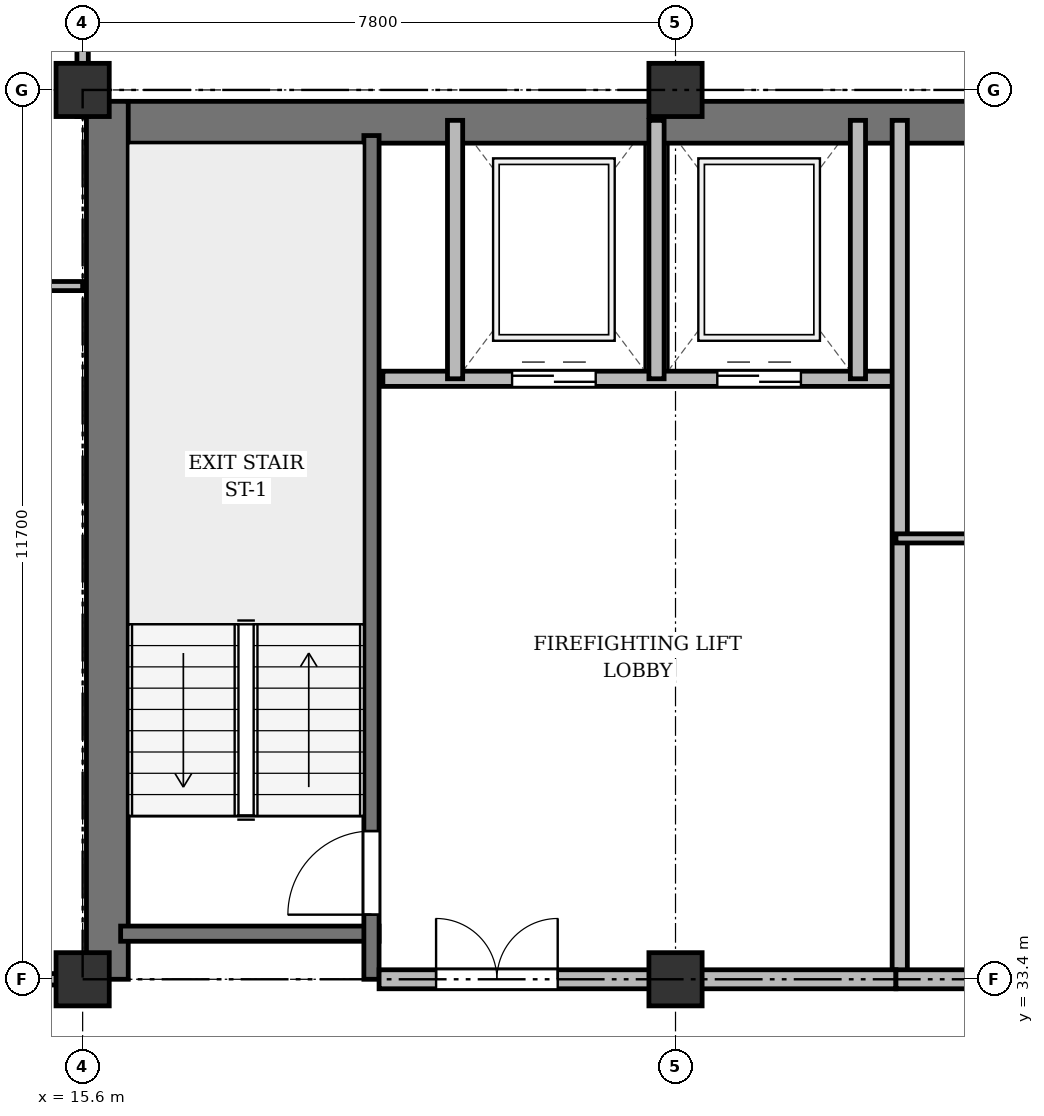
"""IFC4 building model, lengths in metres.
Left out: names, types, materials, properties, quantities, classifications, styles, units other than length and angle.
Written with IfcOpenShell. Run it as: python <this file> out.ifc"""

import sys

from ifc_helpers import new_model, si_unit, direction, frame, frame_2d, origin, origin_2d, place, context, subcontext, project, spatial, rectangle, extrude, source, transform, mapped, element, fill, save


model = new_model("IFC4")
c1 = context("Model", 3, precision=1e-05, world=origin(), true_north=direction((0.0, 1.0)))
c2 = subcontext(c1, "Body", "Model", "MODEL_VIEW")
j1 = project(units=[si_unit("LENGTHUNIT", "METRE"), si_unit("PLANEANGLEUNIT", "RADIAN")], contexts=[c1])
p1 = place(None, origin())
s1 = spatial("IfcSite", under=j1, at=p1, CompositionType="ELEMENT")
p2 = place(p1, origin())
s2 = spatial("IfcBuilding", under=s1, at=p2, CompositionType="ELEMENT")
p3 = place(p2, frame((0.0, 0.0, 190.5)))
s3 = spatial("IfcBuildingStorey", under=s2, at=p3, CompositionType="ELEMENT", Elevation=190.5)
m1 = source(origin(), c2, "Body", "SweptSolid", [
    extrude(rectangle(XDim=0.7, YDim=0.7, at=origin_2d()), origin(), (0.0, 0.0, 1.0), 3.6),
])
for number, where, z_axis, x_axis in (
    (1, (15.6, 33.4, 0.0), (0.0, 0.0, 1.0), (1.0, 0.0, 0.0)),
    (2, (15.6, 45.1, 0.0), (0.0, 0.0, 1.0), (1.0, 0.0, 0.0)),
    (3, (23.4, 33.4, 0.0), (0.0, 0.0, 1.0), (1.0, 0.0, 0.0)),
    (4, (23.4, 45.1, 0.0), (0.0, 0.0, 1.0), (1.0, 0.0, 0.0)),
):
    element("IfcColumn", number, at=place(p3, frame(where, z_axis=z_axis, x_axis=x_axis)), inside=s3, PredefinedType="COLUMN", context=c2, shape_type="MappedRepresentation", body=[
        mapped(m1, transform((0.0, 0.0, 0.0), x_axis=(1.0, 0.0, 0.0), y_axis=(0.0, 1.0, 0.0), z_axis=(0.0, 0.0, 1.0), scale=1.0)),
    ])
p4 = place(p3, frame((15.65, 44.675, 0.0), z_axis=(0.0, 0.0, 1.0), x_axis=(1.0, 0.0, 0.0)))
e5 = element("IfcWall", 5, at=p4, inside=s3, PredefinedType="SHEAR", context=c2, shape_type="SweptSolid", body=[
    extrude(rectangle(XDim=43.1, YDim=0.55, at=frame_2d((21.55, 0.0))), origin(), (0.0, 0.0, 1.0), 3.36),
])
p5 = place(p3, frame((15.925, 33.4, 0.0), z_axis=(0.0, 0.0, 1.0), x_axis=(0.0, 1.0, 0.0)))
e6 = element("IfcWall", 6, at=p5, inside=s3, PredefinedType="SHEAR", context=c2, shape_type="SweptSolid", body=[
    extrude(rectangle(XDim=11.55, YDim=0.55, at=frame_2d((5.775, 0.0))), origin(), (0.0, 0.0, 1.0), 3.36),
])
p6 = place(p3, frame((16.1, 34.0, 0.0), z_axis=(0.0, 0.0, 1.0), x_axis=(1.0, 0.0, 0.0)))
e7 = element("IfcWall", 7, at=p6, inside=s3, PredefinedType="SHEAR", context=c2, shape_type="SweptSolid", body=[
    extrude(rectangle(XDim=3.4, YDim=0.2, at=frame_2d((1.7, 0.0))), origin(), (0.0, 0.0, 1.0), 3.36),
])
p7 = place(p3, frame((19.4, 33.4, 0.0), z_axis=(0.0, 0.0, 1.0), x_axis=(0.0, 1.0, 0.0)))
e8 = element("IfcWall", 8, at=p7, inside=s3, PredefinedType="SHEAR", context=c2, shape_type="SweptSolid", body=[
    extrude(rectangle(XDim=11.1, YDim=0.2, at=frame_2d((5.55, 0.0))), origin(), (0.0, 0.0, 1.0), 3.36),
])
p8 = place(p7, frame((0.85, 0.0, 0.0)))
e9 = element("IfcOpeningElement", 9, at=p8, cuts=e8, PredefinedType="OPENING", context=c2, shape_type="SweptSolid", body=[
    extrude(rectangle(XDim=1.1, YDim=2.15, at=frame_2d((0.55, 1.075))), frame((0.0, 0.11, 0.0), z_axis=(0.0, -1.0, 0.0), x_axis=(1.0, 0.0, 0.0)), (0.0, 0.0, 1.0), 0.22),
])
p9 = place(p3, frame((19.55, 41.3, 0.0), z_axis=(0.0, 0.0, 1.0), x_axis=(1.0, 0.0, 0.0)))
e10 = element("IfcWall", 10, at=p9, inside=s3, PredefinedType="SOLIDWALL", context=c2, shape_type="SweptSolid", body=[
    extrude(rectangle(XDim=6.75, YDim=0.2, at=frame_2d((3.375, 0.0))), origin(), (0.0, 0.0, 1.0), 3.36),
])
p10 = place(p9, frame((1.7, 0.0, 0.0)))
e11 = element("IfcOpeningElement", 11, at=p10, cuts=e10, PredefinedType="OPENING", context=c2, shape_type="SweptSolid", body=[
    extrude(rectangle(XDim=1.1, YDim=2.15, at=frame_2d((0.55, 1.075))), frame((0.0, 0.11, 0.0), z_axis=(0.0, -1.0, 0.0), x_axis=(1.0, 0.0, 0.0)), (0.0, 0.0, 1.0), 0.22),
])
p11 = place(p9, frame((4.4, 0.0, 0.0)))
e12 = element("IfcOpeningElement", 12, at=p11, cuts=e10, PredefinedType="OPENING", context=c2, shape_type="SweptSolid", body=[
    extrude(rectangle(XDim=1.1, YDim=2.15, at=frame_2d((0.55, 1.075))), frame((0.0, 0.11, 0.0), z_axis=(0.0, -1.0, 0.0), x_axis=(1.0, 0.0, 0.0)), (0.0, 0.0, 1.0), 0.22),
])
for number, where, z_axis, x_axis in (
    (13, (20.5, 41.3, 0.0), (0.0, 0.0, 1.0), (0.0, 1.0, 0.0)),
    (14, (23.15, 41.3, 0.0), (0.0, 0.0, 1.0), (0.0, 1.0, 0.0)),
    (15, (25.8, 41.3, 0.0), (0.0, 0.0, 1.0), (0.0, 1.0, 0.0)),
):
    element("IfcWall", number, at=place(p3, frame(where, z_axis=z_axis, x_axis=x_axis)), inside=s3, PredefinedType="SOLIDWALL", context=c2, shape_type="SweptSolid", body=[
        extrude(rectangle(XDim=3.4, YDim=0.2, at=frame_2d((1.7, 0.0))), origin(), (0.0, 0.0, 1.0), 3.36),
    ])
p12 = place(p3, frame((26.35, 33.4, 0.0), z_axis=(0.0, 0.0, 1.0), x_axis=(0.0, 1.0, 0.0)))
e16 = element("IfcWall", 16, at=p12, inside=s3, PredefinedType="SOLIDWALL", context=c2, shape_type="SweptSolid", body=[
    extrude(rectangle(XDim=11.3, YDim=0.2, at=frame_2d((5.65, 0.0))), origin(), (0.0, 0.0, 1.0), 2.91),
])
p13 = place(p3, frame((19.5, 33.4, 0.0), z_axis=(0.0, 0.0, 1.0), x_axis=(1.0, 0.0, 0.0)))
e17 = element("IfcWall", 17, at=p13, inside=s3, PredefinedType="PARTITIONING", context=c2, shape_type="SweptSolid", body=[
    extrude(rectangle(XDim=6.8, YDim=0.25, at=frame_2d((3.4, 0.0))), origin(), (0.0, 0.0, 1.0), 2.91),
])
p14 = place(p13, frame((0.75, 0.0, 0.0)))
e18 = element("IfcOpeningElement", 18, at=p14, cuts=e17, PredefinedType="OPENING", context=c2, shape_type="SweptSolid", body=[
    extrude(rectangle(XDim=1.6, YDim=2.2, at=frame_2d((0.8, 1.1))), frame((0.0, 0.135, 0.0), z_axis=(0.0, -1.0, 0.0), x_axis=(1.0, 0.0, 0.0)), (0.0, 0.0, 1.0), 0.27),
])
p15 = place(p3, frame((26.3, 39.2, 0.0), z_axis=(0.0, 0.0, 1.0), x_axis=(1.0, 0.0, 0.0)))
e19 = element("IfcWall", 19, at=p15, inside=s3, PredefinedType="PARTITIONING", context=c2, shape_type="SweptSolid", body=[
    extrude(rectangle(XDim=7.0, YDim=0.12, at=frame_2d((3.5, 0.0))), origin(), (0.0, 0.0, 1.0), 2.86),
])
p16 = place(p15, frame((2.6, 0.0, 0.0)))
e20 = element("IfcOpeningElement", 20, at=p16, cuts=e19, PredefinedType="OPENING", context=c2, shape_type="SweptSolid", body=[
    extrude(rectangle(XDim=0.95, YDim=2.15, at=frame_2d((0.475, 1.075))), frame((0.0, 0.07, 0.0), z_axis=(0.0, -1.0, 0.0), x_axis=(1.0, 0.0, 0.0)), (0.0, 0.0, 1.0), 0.14),
])
p17 = place(p3, frame((26.3, 33.4, 0.0), z_axis=(0.0, 0.0, 1.0), x_axis=(1.0, 0.0, 0.0)))
e21 = element("IfcWall", 21, at=p17, inside=s3, PredefinedType="PARTITIONING", context=c2, shape_type="SweptSolid", body=[
    extrude(rectangle(XDim=7.0, YDim=0.25, at=frame_2d((3.5, 0.0))), origin(), (0.0, 0.0, 1.0), 2.91),
])
p18 = place(p17, frame((1.35, 0.0, 0.0)))
e22 = element("IfcOpeningElement", 22, at=p18, cuts=e21, PredefinedType="OPENING", context=c2, shape_type="SweptSolid", body=[
    extrude(rectangle(XDim=0.95, YDim=2.15, at=frame_2d((0.475, 1.075))), frame((0.0, 0.135, 0.0), z_axis=(0.0, -1.0, 0.0), x_axis=(1.0, 0.0, 0.0)), (0.0, 0.0, 1.0), 0.27),
])
p19 = place(p3, frame((11.925, 42.52, 0.0), z_axis=(0.0, 0.0, 1.0), x_axis=(1.0, 0.0, 0.0)))
e23 = element("IfcWall", 23, at=p19, inside=s3, PredefinedType="PARTITIONING", context=c2, shape_type="SweptSolid", body=[
    extrude(rectangle(XDim=3.675, YDim=0.12, at=frame_2d((1.837, 0.0))), origin(), (0.0, 0.0, 1.0), 2.86),
])
p20 = place(p19, frame((1.362, 0.0, 0.0)))
e24 = element("IfcOpeningElement", 24, at=p20, cuts=e23, PredefinedType="OPENING", context=c2, shape_type="SweptSolid", body=[
    extrude(rectangle(XDim=0.95, YDim=2.15, at=frame_2d((0.475, 1.075))), frame((0.0, 0.07, 0.0), z_axis=(0.0, -1.0, 0.0), x_axis=(1.0, 0.0, 0.0)), (0.0, 0.0, 1.0), 0.14),
])
p21 = place(p3, frame((8.25, 33.4, 0.0), z_axis=(0.0, 0.0, 1.0), x_axis=(1.0, 0.0, 0.0)))
e25 = element("IfcWall", 25, at=p21, inside=s3, PredefinedType="PARTITIONING", context=c2, shape_type="SweptSolid", body=[
    extrude(rectangle(XDim=7.35, YDim=0.15, at=frame_2d((3.675, 0.0))), origin(), (0.0, 0.0, 1.0), 2.91),
])
p22 = place(p21, frame((4.275, 0.0, 0.0)))
e26 = element("IfcOpeningElement", 26, at=p22, cuts=e25, PredefinedType="OPENING", context=c2, shape_type="SweptSolid", body=[
    extrude(rectangle(XDim=0.95, YDim=2.15, at=frame_2d((0.475, 1.075))), frame((0.0, 0.085, 0.0), z_axis=(0.0, -1.0, 0.0), x_axis=(1.0, 0.0, 0.0)), (0.0, 0.0, 1.0), 0.17),
])
p23 = place(p3, frame((15.6, 44.75, 0.0), z_axis=(0.0, 0.0, 1.0), x_axis=(0.0, 1.0, 0.0)))
e27 = element("IfcWall", 27, at=p23, inside=s3, PredefinedType="PARTITIONING", context=c2, shape_type="SweptSolid", body=[
    extrude(rectangle(XDim=3.61, YDim=0.15, at=frame_2d((1.805, 0.0))), origin(), (0.0, 0.0, 1.0), 2.86),
])
p24 = place(p23, frame((1.1, 0.0, 0.0)))
e28 = element("IfcOpeningElement", 28, at=p24, cuts=e27, PredefinedType="OPENING", context=c2, shape_type="SweptSolid", body=[
    extrude(rectangle(XDim=0.95, YDim=2.15, at=frame_2d((0.475, 1.075))), frame((0.0, 0.085, 0.0), z_axis=(0.0, -1.0, 0.0), x_axis=(1.0, 0.0, 0.0)), (0.0, 0.0, 1.0), 0.17),
])
m2 = source(origin(), c2, "Body", "SweptSolid", [
    extrude(rectangle(XDim=1.1, YDim=2.15, at=frame_2d((0.55, 1.075))), frame((0.0, 0.025, 0.0), z_axis=(0.0, -1.0, 0.0), x_axis=(1.0, 0.0, 0.0)), (0.0, 0.0, 1.0), 0.05),
])
p25 = place(p8, origin())
e29 = element("IfcDoor", 29, at=p25, inside=s3, OperationType="SINGLE_SWING_LEFT", PredefinedType="DOOR", context=c2, shape_type="MappedRepresentation", body=[
    mapped(m2, transform((0.0, 0.0, 0.0), x_axis=(1.0, 0.0, 0.0), y_axis=(0.0, 1.0, 0.0), z_axis=(0.0, 0.0, 1.0), scale=1.0)),
])
fill(e9, e29)
p26 = place(p10, origin())
e30 = element("IfcDoor", 30, at=p26, inside=s3, OperationType="DOUBLE_DOOR_SLIDING", PredefinedType="DOOR", context=c2, shape_type="MappedRepresentation", body=[
    mapped(m2, transform((0.0, 0.0, 0.0), x_axis=(1.0, 0.0, 0.0), y_axis=(0.0, 1.0, 0.0), z_axis=(0.0, 0.0, 1.0), scale=1.0)),
])
fill(e11, e30)
p27 = place(p11, origin())
e31 = element("IfcDoor", 31, at=p27, inside=s3, OperationType="DOUBLE_DOOR_SLIDING", PredefinedType="DOOR", context=c2, shape_type="MappedRepresentation", body=[
    mapped(m2, transform((0.0, 0.0, 0.0), x_axis=(1.0, 0.0, 0.0), y_axis=(0.0, 1.0, 0.0), z_axis=(0.0, 0.0, 1.0), scale=1.0)),
])
fill(e12, e31)
m3 = source(origin(), c2, "Body", "SweptSolid", [
    extrude(rectangle(XDim=1.6, YDim=2.2, at=frame_2d((0.8, 1.1))), frame((0.0, 0.025, 0.0), z_axis=(0.0, -1.0, 0.0), x_axis=(1.0, 0.0, 0.0)), (0.0, 0.0, 1.0), 0.05),
])
p28 = place(p14, origin())
e32 = element("IfcDoor", 32, at=p28, inside=s3, OperationType="DOUBLE_DOOR_SINGLE_SWING", PredefinedType="DOOR", context=c2, shape_type="MappedRepresentation", body=[
    mapped(m3, transform((0.0, 0.0, 0.0), x_axis=(1.0, 0.0, 0.0), y_axis=(0.0, 1.0, 0.0), z_axis=(0.0, 0.0, 1.0), scale=1.0)),
])
fill(e18, e32)
save(model, sys.argv[1])
